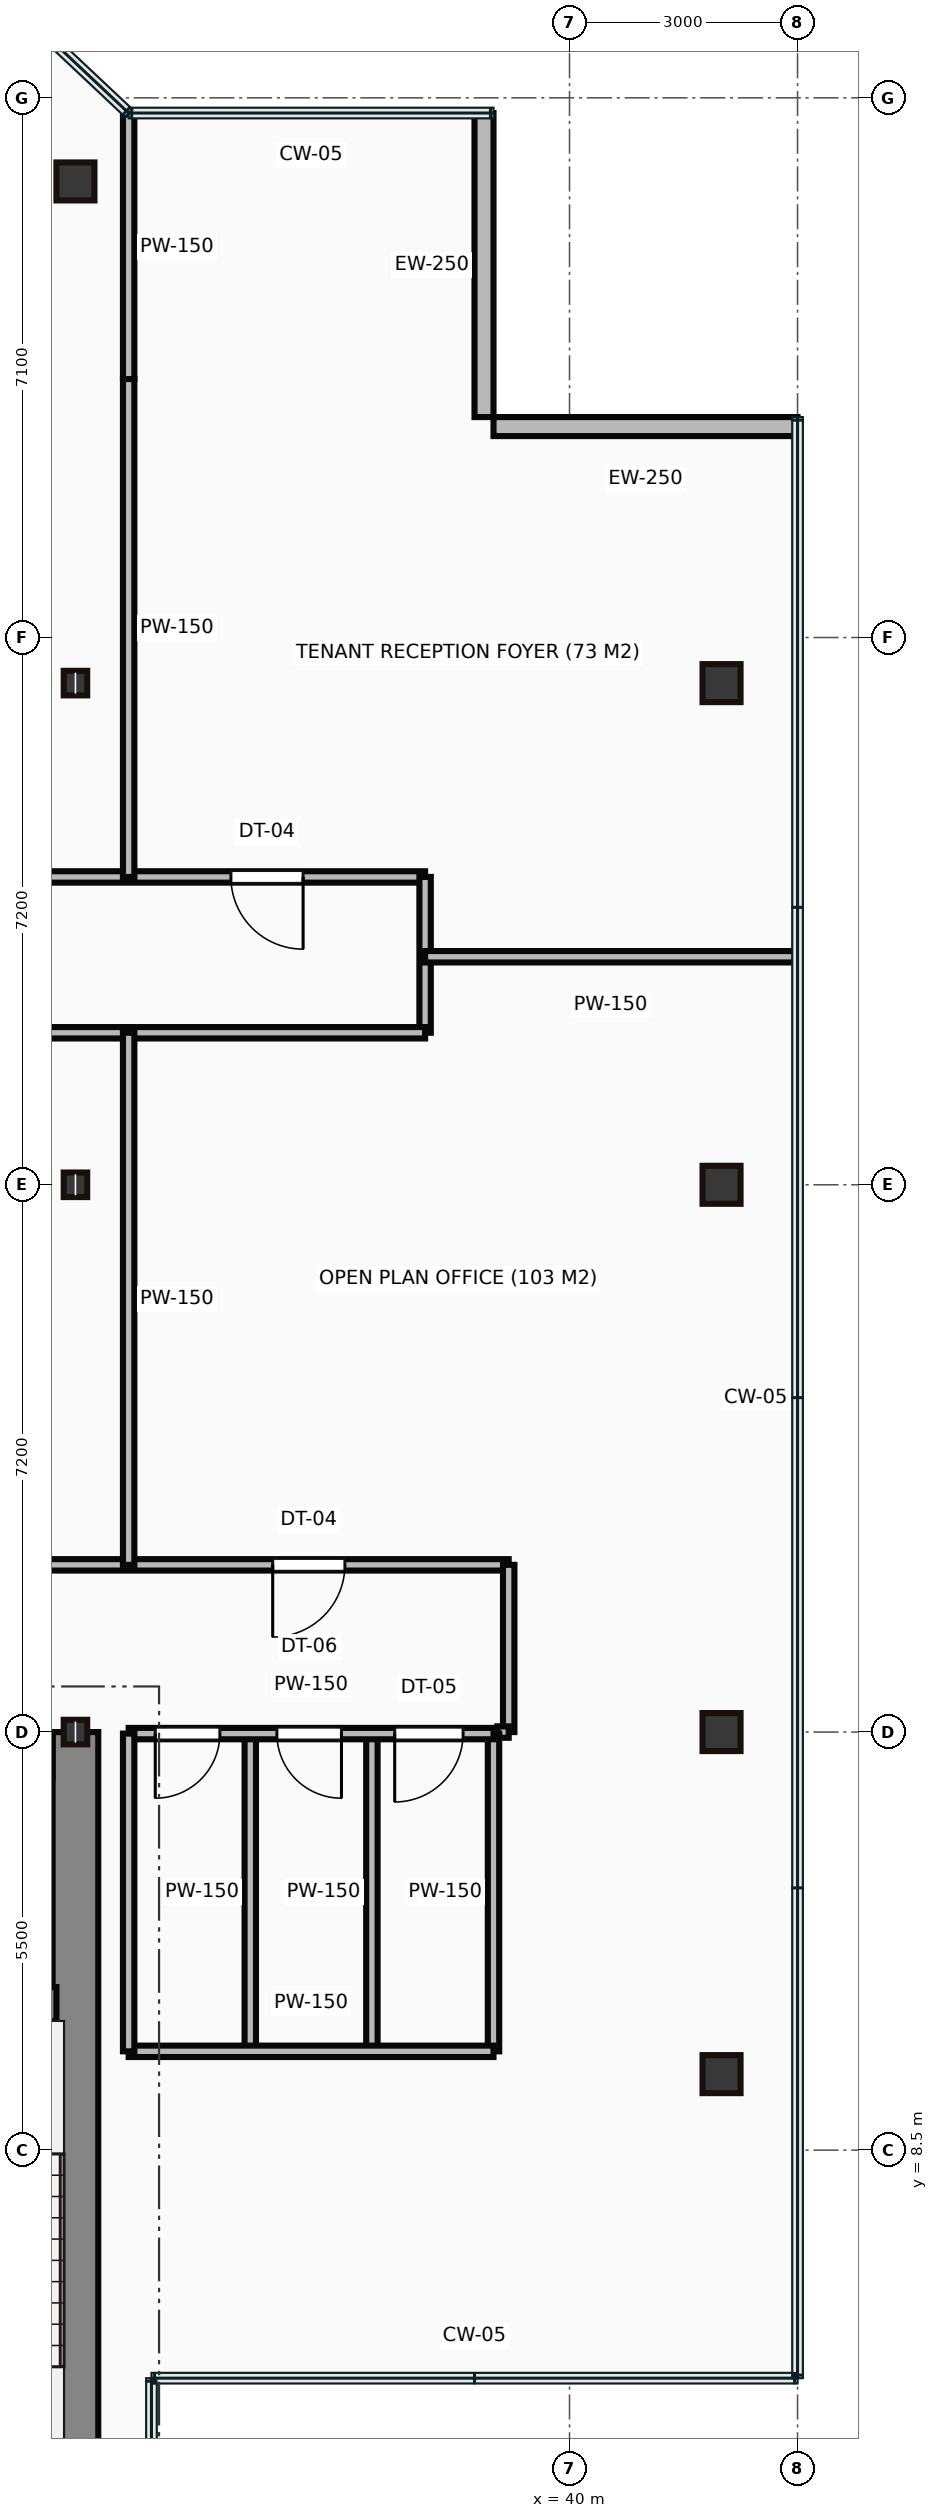
"""IFC4 building model, lengths in metres.
Left out: names, types, materials, properties, quantities, classifications, styles, units other than length and angle.
Written with IfcOpenShell. Run it as: python <this file> out.ifc"""

import sys

from ifc_helpers import new_model, si_unit, direction, frame, frame_2d, origin, origin_2d, place, context, subcontext, project, spatial, rectangle, hollow_rectangle, i_section, extrude, source, transform, mapped, element, fill, save


model = new_model("IFC4")
c1 = context("Model", 3, precision=1e-05, world=origin(), true_north=direction((0.0, 1.0)))
c2 = subcontext(c1, "Body", "Model", "MODEL_VIEW")
j1 = project(units=[si_unit("LENGTHUNIT", "METRE"), si_unit("PLANEANGLEUNIT", "RADIAN")], contexts=[c1])
p1 = place(None, origin())
s1 = spatial("IfcSite", under=j1, at=p1, CompositionType="ELEMENT")
p2 = place(p1, origin())
s2 = spatial("IfcBuilding", under=s1, at=p2, CompositionType="ELEMENT")
p3 = place(p2, frame((0.0, 0.0, 210.5)))
s3 = spatial("IfcBuildingStorey", under=s2, at=p3, CompositionType="ELEMENT", Elevation=210.5)
m1 = source(origin(), c2, "Body", "SweptSolid", [
    extrude(rectangle(XDim=13.1, YDim=0.6, at=frame_2d((6.55, 0.0))), origin(), (0.0, 0.0, 1.0), 3.65),
])
p4 = place(p3, frame((33.5, 0.9, 0.0), z_axis=(0.0, 0.0, 1.0), x_axis=(0.0, 1.0, 0.0)))
e1 = element("IfcWall", 1, at=p4, inside=s3, PredefinedType="SHEAR", context=c2, shape_type="MappedRepresentation", body=[
    mapped(m1, transform((0.0, 0.0, 0.0))),
])
m2 = source(origin(), c2, "Body", "SweptSolid", [
    extrude(rectangle(XDim=3.39, YDim=0.45, at=frame_2d((1.695, 0.0))), origin(), (0.0, 0.0, 1.0), 3.65),
])
p5 = place(p3, frame((29.86, 10.42, 0.0), z_axis=(0.0, 0.0, 1.0), x_axis=(1.0, 0.0, 0.0)))
e2 = element("IfcWall", 2, at=p5, inside=s3, PredefinedType="SHEAR", context=c2, shape_type="MappedRepresentation", body=[
    mapped(m2, transform((0.0, 0.0, 0.0))),
])
p6 = place(p5, frame((1.1, 0.0, 0.0)))
e3 = element("IfcOpeningElement", 3, at=p6, cuts=e2, PredefinedType="OPENING", context=c2, shape_type="SweptSolid", body=[
    extrude(rectangle(XDim=1.1, YDim=2.15, at=frame_2d((0.55, 1.075))), frame((0.0, 0.235, 0.0), z_axis=(0.0, -1.0, 0.0), x_axis=(1.0, 0.0, 0.0)), (0.0, 0.0, 1.0), 0.47),
])
m3 = source(origin(), c2, "Body", "SweptSolid", [
    extrude(i_section(OverallWidth=0.309, OverallDepth=0.323, WebThickness=0.014, FlangeThickness=0.023, at=origin_2d()), origin(), (0.0, 0.0, 1.0), 3.65),
])
for number, where, z_axis, x_axis in (
    (4, (33.5, 14.0, 0.0), (0.0, 0.0, 1.0), (1.0, 0.0, 0.0)),
    (5, (33.5, 21.2, 0.0), (0.0, 0.0, 1.0), (1.0, 0.0, 0.0)),
    (6, (33.5, 27.8, 0.0), (0.0, 0.0, 1.0), (1.0, 0.0, 0.0)),
):
    element("IfcColumn", number, at=place(p3, frame(where, z_axis=z_axis, x_axis=x_axis)), inside=s3, PredefinedType="COLUMN", context=c2, shape_type="MappedRepresentation", body=[
        mapped(m3, transform((0.0, 0.0, 0.0))),
    ])
m4 = source(origin(), c2, "Body", "SweptSolid", [
    extrude(hollow_rectangle(XDim=0.5, YDim=0.5, WallThickness=0.022, at=origin_2d()), origin(), (0.0, 0.0, 1.0), 3.65),
])
for number, where, z_axis, x_axis in (
    (7, (33.5, 34.4, 0.0), (0.0, 0.0, 1.0), (1.0, 0.0, 0.0)),
    (8, (42.0, 9.5, 0.0), (0.0, 0.0, 1.0), (1.0, 0.0, 0.0)),
    (9, (42.0, 14.0, 0.0), (0.0, 0.0, 1.0), (1.0, 0.0, 0.0)),
    (10, (42.0, 21.2, 0.0), (0.0, 0.0, 1.0), (1.0, 0.0, 0.0)),
    (11, (42.0, 27.8, 0.0), (0.0, 0.0, 1.0), (1.0, 0.0, 0.0)),
):
    element("IfcColumn", number, at=place(p3, frame(where, z_axis=z_axis, x_axis=x_axis)), inside=s3, PredefinedType="COLUMN", context=c2, shape_type="MappedRepresentation", body=[
        mapped(m4, transform((0.0, 0.0, 0.0))),
    ])
m5 = source(origin(), c2, "Body", "SweptSolid", [
    extrude(rectangle(XDim=4.0, YDim=0.25, at=frame_2d((2.0, 0.0))), origin(), (0.0, 0.0, 1.0), 3.4),
])
for number, where, z_axis, x_axis in (
    (12, (43.0, 31.175, 0.0), (0.0, 0.0, 1.0), (-1.0, 0.0, 0.0)),
    (13, (38.875, 31.3, 0.0), (0.0, 0.0, 1.0), (0.0, 1.0, 0.0)),
):
    element("IfcWall", number, at=place(p3, frame(where, z_axis=z_axis, x_axis=x_axis)), inside=s3, PredefinedType="STANDARD", context=c2, shape_type="MappedRepresentation", body=[
        mapped(m5, transform((0.0, 0.0, 0.0))),
    ])
m6 = source(origin(), c2, "Body", "SweptSolid", [
    extrude(rectangle(XDim=4.8, YDim=0.15, at=frame_2d((2.4, 0.0))), origin(), (0.0, 0.0, 1.0), 2.787),
])
p7 = place(p3, frame((34.2, 13.98, 0.0), z_axis=(0.0, 0.0, 1.0), x_axis=(1.0, 0.0, 0.0)))
e14 = element("IfcWall", 14, at=p7, inside=s3, PredefinedType="PARTITIONING", context=c2, shape_type="MappedRepresentation", body=[
    mapped(m6, transform((0.0, 0.0, 0.0))),
])
p8 = place(p7, frame((0.35, 0.0, 0.0)))
e15 = element("IfcOpeningElement", 15, at=p8, cuts=e14, PredefinedType="OPENING", context=c2, shape_type="SweptSolid", body=[
    extrude(rectangle(XDim=0.85, YDim=2.1, at=frame_2d((0.425, 1.05))), frame((0.0, 0.085, 0.0), z_axis=(0.0, -1.0, 0.0), x_axis=(1.0, 0.0, 0.0)), (0.0, 0.0, 1.0), 0.17),
])
p9 = place(p7, frame((1.95, 0.0, 0.0)))
e16 = element("IfcOpeningElement", 16, at=p9, cuts=e14, PredefinedType="OPENING", context=c2, shape_type="SweptSolid", body=[
    extrude(rectangle(XDim=0.85, YDim=2.1, at=frame_2d((0.425, 1.05))), frame((0.0, 0.085, 0.0), z_axis=(0.0, -1.0, 0.0), x_axis=(1.0, 0.0, 0.0)), (0.0, 0.0, 1.0), 0.17),
])
p10 = place(p7, frame((3.5, 0.0, 0.0)))
e17 = element("IfcOpeningElement", 17, at=p10, cuts=e14, PredefinedType="OPENING", context=c2, shape_type="SweptSolid", body=[
    extrude(rectangle(XDim=0.9, YDim=2.1, at=frame_2d((0.45, 1.05))), frame((0.0, 0.085, 0.0), z_axis=(0.0, -1.0, 0.0), x_axis=(1.0, 0.0, 0.0)), (0.0, 0.0, 1.0), 0.17),
])
m7 = source(origin(), c2, "Body", "SweptSolid", [
    extrude(rectangle(XDim=4.8, YDim=0.15, at=frame_2d((2.4, 0.0))), origin(), (0.0, 0.0, 1.0), 3.4),
])
p11 = place(p3, frame((34.2, 9.8, 0.0), z_axis=(0.0, 0.0, 1.0), x_axis=(1.0, 0.0, 0.0)))
e18 = element("IfcWall", 18, at=p11, inside=s3, PredefinedType="PARTITIONING", context=c2, shape_type="MappedRepresentation", body=[
    mapped(m7, transform((0.0, 0.0, 0.0))),
])
m8 = source(origin(), c2, "Body", "SweptSolid", [
    extrude(rectangle(XDim=4.18, YDim=0.15, at=frame_2d((2.09, 0.0))), origin(), (0.0, 0.0, 1.0), 3.4),
])
for number, where, z_axis, x_axis in (
    (19, (39.0, 9.8, 0.0), (0.0, 0.0, 1.0), (0.0, 1.0, 0.0)),
    (20, (34.2, 9.8, 0.0), (0.0, 0.0, 1.0), (0.0, 1.0, 0.0)),
    (21, (35.8, 9.8, 0.0), (0.0, 0.0, 1.0), (0.0, 1.0, 0.0)),
    (22, (37.4, 9.8, 0.0), (0.0, 0.0, 1.0), (0.0, 1.0, 0.0)),
):
    element("IfcWall", number, at=place(p3, frame(where, z_axis=z_axis, x_axis=x_axis)), inside=s3, PredefinedType="PARTITIONING", context=c2, shape_type="MappedRepresentation", body=[
        mapped(m8, transform((0.0, 0.0, 0.0))),
    ])
m9 = source(origin(), c2, "Body", "SweptSolid", [
    extrude(rectangle(XDim=26.1, YDim=0.15, at=frame_2d((13.05, 0.0))), origin(), (0.0, 0.0, 1.0), 3.4),
])
p12 = place(p3, frame((12.0, 25.25, 0.0), z_axis=(0.0, 0.0, 1.0), x_axis=(1.0, 0.0, 0.0)))
e23 = element("IfcWall", 23, at=p12, inside=s3, PredefinedType="PARTITIONING", context=c2, shape_type="MappedRepresentation", body=[
    mapped(m9, transform((0.0, 0.0, 0.0))),
])
p13 = place(p12, frame((3.455, 0.0, 0.0)))
e24 = element("IfcOpeningElement", 24, at=p13, cuts=e23, PredefinedType="OPENING", context=c2, shape_type="SweptSolid", body=[
    extrude(rectangle(XDim=0.95, YDim=2.15, at=frame_2d((0.475, 1.075))), frame((0.0, 0.085, 0.0), z_axis=(0.0, -1.0, 0.0), x_axis=(1.0, 0.0, 0.0)), (0.0, 0.0, 1.0), 0.17),
])
p14 = place(p12, frame((14.425, 0.0, 0.0)))
e25 = element("IfcOpeningElement", 25, at=p14, cuts=e23, PredefinedType="OPENING", context=c2, shape_type="SweptSolid", body=[
    extrude(rectangle(XDim=0.95, YDim=2.15, at=frame_2d((0.475, 1.075))), frame((0.0, 0.085, 0.0), z_axis=(0.0, -1.0, 0.0), x_axis=(1.0, 0.0, 0.0)), (0.0, 0.0, 1.0), 0.17),
])
p15 = place(p12, frame((23.545, 0.0, 0.0)))
e26 = element("IfcOpeningElement", 26, at=p15, cuts=e23, PredefinedType="OPENING", context=c2, shape_type="SweptSolid", body=[
    extrude(rectangle(XDim=0.95, YDim=2.15, at=frame_2d((0.475, 1.075))), frame((0.0, 0.085, 0.0), z_axis=(0.0, -1.0, 0.0), x_axis=(1.0, 0.0, 0.0)), (0.0, 0.0, 1.0), 0.17),
])
m10 = source(origin(), c2, "Body", "SweptSolid", [
    extrude(rectangle(XDim=2.05, YDim=0.15, at=frame_2d((1.025, 0.0))), origin(), (0.0, 0.0, 1.0), 3.4),
])
p16 = place(p3, frame((38.1, 25.25, 0.0), z_axis=(0.0, 0.0, 1.0), x_axis=(0.0, -1.0, 0.0)))
e27 = element("IfcWall", 27, at=p16, inside=s3, PredefinedType="PARTITIONING", context=c2, shape_type="MappedRepresentation", body=[
    mapped(m10, transform((0.0, 0.0, 0.0))),
])
p17 = place(p3, frame((38.1, 23.2, 0.0), z_axis=(0.0, 0.0, 1.0), x_axis=(-1.0, 0.0, 0.0)))
e28 = element("IfcWall", 28, at=p17, inside=s3, PredefinedType="PARTITIONING", context=c2, shape_type="MappedRepresentation", body=[
    mapped(m9, transform((0.0, 0.0, 0.0))),
])
p18 = place(p17, frame((10.725, 0.0, 0.0)))
e29 = element("IfcOpeningElement", 29, at=p18, cuts=e28, PredefinedType="OPENING", context=c2, shape_type="SweptSolid", body=[
    extrude(rectangle(XDim=0.95, YDim=2.15, at=frame_2d((0.475, 1.075))), frame((0.0, 0.085, 0.0), z_axis=(0.0, -1.0, 0.0), x_axis=(1.0, 0.0, 0.0)), (0.0, 0.0, 1.0), 0.17),
])
m11 = source(origin(), c2, "Body", "SweptSolid", [
    extrude(rectangle(XDim=27.2, YDim=0.15, at=frame_2d((13.6, 0.0))), origin(), (0.0, 0.0, 1.0), 3.4),
])
p19 = place(p3, frame((12.0, 16.2, 0.0), z_axis=(0.0, 0.0, 1.0), x_axis=(1.0, 0.0, 0.0)))
e30 = element("IfcWall", 30, at=p19, inside=s3, PredefinedType="PARTITIONING", context=c2, shape_type="MappedRepresentation", body=[
    mapped(m11, transform((0.0, 0.0, 0.0))),
])
p20 = place(p19, frame((3.455, 0.0, 0.0)))
e31 = element("IfcOpeningElement", 31, at=p20, cuts=e30, PredefinedType="OPENING", context=c2, shape_type="SweptSolid", body=[
    extrude(rectangle(XDim=0.95, YDim=2.15, at=frame_2d((0.475, 1.075))), frame((0.0, 0.085, 0.0), z_axis=(0.0, -1.0, 0.0), x_axis=(1.0, 0.0, 0.0)), (0.0, 0.0, 1.0), 0.17),
])
p21 = place(p19, frame((24.095, 0.0, 0.0)))
e32 = element("IfcOpeningElement", 32, at=p21, cuts=e30, PredefinedType="OPENING", context=c2, shape_type="SweptSolid", body=[
    extrude(rectangle(XDim=0.95, YDim=2.15, at=frame_2d((0.475, 1.075))), frame((0.0, 0.085, 0.0), z_axis=(0.0, -1.0, 0.0), x_axis=(1.0, 0.0, 0.0)), (0.0, 0.0, 1.0), 0.17),
])
m12 = source(origin(), c2, "Body", "SweptSolid", [
    extrude(rectangle(XDim=2.2, YDim=0.15, at=frame_2d((1.1, 0.0))), origin(), (0.0, 0.0, 1.0), 3.4),
])
p22 = place(p3, frame((39.2, 16.2, 0.0), z_axis=(0.0, 0.0, 1.0), x_axis=(0.0, -1.0, 0.0)))
e33 = element("IfcWall", 33, at=p22, inside=s3, PredefinedType="PARTITIONING", context=c2, shape_type="MappedRepresentation", body=[
    mapped(m12, transform((0.0, 0.0, 0.0))),
])
m13 = source(origin(), c2, "Body", "SweptSolid", [
    extrude(rectangle(XDim=0.15, YDim=0.15, at=frame_2d((0.075, 0.0))), origin(), (0.0, 0.0, 1.0), 3.4),
])
p23 = place(p3, frame((39.2, 14.0, 0.0), z_axis=(0.0, 0.0, 1.0), x_axis=(-1.0, 0.0, 0.0)))
e34 = element("IfcWall", 34, at=p23, inside=s3, PredefinedType="PARTITIONING", context=c2, shape_type="MappedRepresentation", body=[
    mapped(m13, transform((0.0, 0.0, 0.0))),
])
m14 = source(origin(), c2, "Body", "SweptSolid", [
    extrude(rectangle(XDim=7.0, YDim=0.15, at=frame_2d((3.5, 0.0))), origin(), (0.0, 0.0, 1.0), 3.4),
])
p24 = place(p3, frame((34.2, 23.2, 0.0), z_axis=(0.0, 0.0, 1.0), x_axis=(0.0, -1.0, 0.0)))
e35 = element("IfcWall", 35, at=p24, inside=s3, PredefinedType="PARTITIONING", context=c2, shape_type="MappedRepresentation", body=[
    mapped(m14, transform((0.0, 0.0, 0.0))),
])
m15 = source(origin(), c2, "Body", "SweptSolid", [
    extrude(rectangle(XDim=3.48, YDim=0.15, at=frame_2d((1.74, 0.0))), origin(), (0.0, 0.0, 1.0), 3.4),
])
p25 = place(p3, frame((34.2, 35.28, 0.0), z_axis=(0.0, 0.0, 1.0), x_axis=(0.0, -1.0, 0.0)))
e36 = element("IfcWall", 36, at=p25, inside=s3, PredefinedType="PARTITIONING", context=c2, shape_type="MappedRepresentation", body=[
    mapped(m15, transform((0.0, 0.0, 0.0))),
])
m16 = source(origin(), c2, "Body", "SweptSolid", [
    extrude(rectangle(XDim=6.55, YDim=0.15, at=frame_2d((3.275, 0.0))), origin(), (0.0, 0.0, 1.0), 3.4),
])
p26 = place(p3, frame((34.2, 31.8, 0.0), z_axis=(0.0, 0.0, 1.0), x_axis=(0.0, -1.0, 0.0)))
e37 = element("IfcWall", 37, at=p26, inside=s3, PredefinedType="PARTITIONING", context=c2, shape_type="MappedRepresentation", body=[
    mapped(m16, transform((0.0, 0.0, 0.0))),
])
m17 = source(origin(), c2, "Body", "SweptSolid", [
    extrude(rectangle(XDim=4.88, YDim=0.15, at=frame_2d((2.44, 0.0))), origin(), (0.0, 0.0, 1.0), 3.4),
])
p27 = place(p3, frame((42.98, 24.2, 0.0), z_axis=(0.0, 0.0, 1.0), x_axis=(-1.0, 0.0, 0.0)))
e38 = element("IfcWall", 38, at=p27, inside=s3, PredefinedType="PARTITIONING", context=c2, shape_type="MappedRepresentation", body=[
    mapped(m17, transform((0.0, 0.0, 0.0))),
])
m18 = source(origin(), c2, "Body", "SweptSolid", [
    extrude(rectangle(XDim=0.85, YDim=2.1, at=frame_2d((0.425, 1.05))), frame((0.0, 0.025, 0.0), z_axis=(0.0, -1.0, 0.0), x_axis=(1.0, 0.0, 0.0)), (0.0, 0.0, 1.0), 0.05),
])
p28 = place(p8, frame((0.85, 0.0, 0.0), z_axis=(0.0, 0.0, 1.0), x_axis=(-1.0, 0.0, 0.0)))
e39 = element("IfcDoor", 39, at=p28, inside=s3, OperationType="SINGLE_SWING_LEFT", PredefinedType="DOOR", context=c2, shape_type="MappedRepresentation", body=[
    mapped(m18, transform((0.0, 0.0, 0.0))),
])
fill(e15, e39)
p29 = place(p9, frame((0.85, 0.0, 0.0), z_axis=(0.0, 0.0, 1.0), x_axis=(-1.0, 0.0, 0.0)))
e40 = element("IfcDoor", 40, at=p29, inside=s3, OperationType="SINGLE_SWING_RIGHT", PredefinedType="DOOR", context=c2, shape_type="MappedRepresentation", body=[
    mapped(m18, transform((0.0, 0.0, 0.0))),
])
fill(e16, e40)
m19 = source(origin(), c2, "Body", "SweptSolid", [
    extrude(rectangle(XDim=0.9, YDim=2.1, at=frame_2d((0.45, 1.05))), frame((0.0, 0.025, 0.0), z_axis=(0.0, -1.0, 0.0), x_axis=(1.0, 0.0, 0.0)), (0.0, 0.0, 1.0), 0.05),
])
p30 = place(p10, frame((0.9, 0.0, 0.0), z_axis=(0.0, 0.0, 1.0), x_axis=(-1.0, 0.0, 0.0)))
e41 = element("IfcDoor", 41, at=p30, inside=s3, OperationType="SINGLE_SWING_LEFT", PredefinedType="DOOR", context=c2, shape_type="MappedRepresentation", body=[
    mapped(m19, transform((0.0, 0.0, 0.0))),
])
fill(e17, e41)
m20 = source(origin(), c2, "Body", "SweptSolid", [
    extrude(rectangle(XDim=0.95, YDim=2.15, at=frame_2d((0.475, 1.075))), frame((0.0, 0.025, 0.0), z_axis=(0.0, -1.0, 0.0), x_axis=(1.0, 0.0, 0.0)), (0.0, 0.0, 1.0), 0.05),
])
p31 = place(p15, origin())
e42 = element("IfcDoor", 42, at=p31, inside=s3, OperationType="SINGLE_SWING_RIGHT", PredefinedType="DOOR", context=c2, shape_type="MappedRepresentation", body=[
    mapped(m20, transform((0.0, 0.0, 0.0))),
])
fill(e26, e42)
p32 = place(p21, origin())
e43 = element("IfcDoor", 43, at=p32, inside=s3, OperationType="SINGLE_SWING_LEFT", PredefinedType="DOOR", context=c2, shape_type="MappedRepresentation", body=[
    mapped(m20, transform((0.0, 0.0, 0.0))),
])
fill(e32, e43)
save(model, sys.argv[1])
